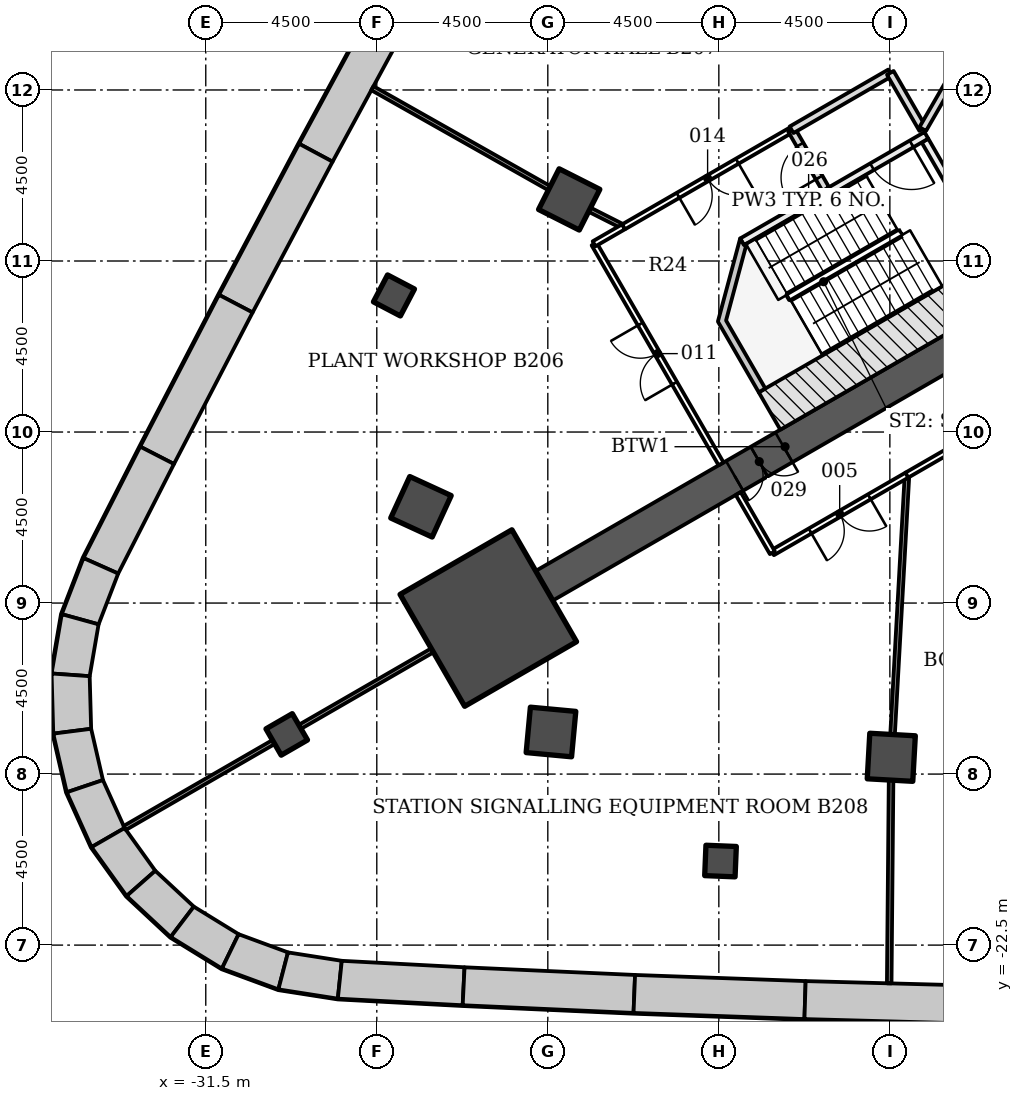
"""IFC4 building model, lengths in metres.
Left out: names, types, materials, properties, quantities, classifications, styles, units other than length and angle.
Written with IfcOpenShell. Run it as: python <this file> out.ifc"""

import sys

from ifc_helpers import new_model, si_unit, direction, frame, frame_2d, origin, origin_2d, place, context, subcontext, project, spatial, polyline, rectangle, outline, extrude, element, fill, save


model = new_model("IFC4")
c1 = context("Model", 3, precision=1e-05, world=origin(), true_north=direction((0.0, 1.0)))
c2 = subcontext(c1, "Body", "Model", "MODEL_VIEW")
j1 = project(units=[si_unit("LENGTHUNIT", "METRE"), si_unit("PLANEANGLEUNIT", "RADIAN")], contexts=[c1])
p1 = place(None, origin())
s1 = spatial("IfcSite", under=j1, at=p1, CompositionType="ELEMENT")
p2 = place(p1, origin())
s2 = spatial("IfcBuilding", under=s1, at=p2, CompositionType="ELEMENT")
p3 = place(p2, frame((0.0, 0.0, -9.0)))
s3 = spatial("IfcBuildingStorey", under=s2, at=p3, CompositionType="ELEMENT", Elevation=-9.0)
p4 = place(p3, origin())
e1 = element("IfcWall", 1, at=p4, inside=s3, PredefinedType="SOLIDWALL", context=c2, shape_type="SweptSolid", body=[
    extrude(outline(polyline([(-26.901, 2.542), (-29.045, -1.415), (-28.164, -1.887), (-26.024, 2.062), (-26.901, 2.542)])), origin(), (0.0, 0.0, 1.0), 4.2),
])
p5 = place(p3, origin())
e2 = element("IfcWall", 2, at=p5, inside=s3, PredefinedType="SOLIDWALL", context=c2, shape_type="SweptSolid", body=[
    extrude(outline(polyline([(-29.045, -1.415), (-31.153, -5.39), (-30.268, -5.854), (-28.164, -1.887), (-29.045, -1.415)])), origin(), (0.0, 0.0, 1.0), 4.2),
])
p6 = place(p3, origin())
e3 = element("IfcWall", 3, at=p6, inside=s3, PredefinedType="SOLIDWALL", context=c2, shape_type="SweptSolid", body=[
    extrude(outline(polyline([(-31.153, -5.39), (-33.226, -9.384), (-32.337, -9.841), (-30.268, -5.854), (-31.153, -5.39)])), origin(), (0.0, 0.0, 1.0), 4.2),
])
p7 = place(p3, origin())
e4 = element("IfcWall", 4, at=p7, inside=s3, PredefinedType="SOLIDWALL", context=c2, shape_type="SweptSolid", body=[
    extrude(outline(polyline([(-33.226, -9.384), (-34.719, -12.316), (-33.804, -12.724), (-32.337, -9.841), (-33.226, -9.384)])), origin(), (0.0, 0.0, 1.0), 4.2),
])
p8 = place(p3, origin())
e5 = element("IfcWall", 5, at=p8, inside=s3, PredefinedType="SOLIDWALL", context=c2, shape_type="SweptSolid", body=[
    extrude(outline(polyline([(-34.719, -12.316), (-35.289, -13.793), (-34.32, -14.06), (-33.804, -12.724), (-34.719, -12.316)])), origin(), (0.0, 0.0, 1.0), 4.2),
])
p9 = place(p3, origin())
e6 = element("IfcWall", 6, at=p9, inside=s3, PredefinedType="SOLIDWALL", context=c2, shape_type="SweptSolid", body=[
    extrude(outline(polyline([(-35.289, -13.793), (-35.557, -15.353), (-34.555, -15.425), (-34.32, -14.06), (-35.289, -13.793)])), origin(), (0.0, 0.0, 1.0), 4.2),
])
p10 = place(p3, origin())
e7 = element("IfcWall", 7, at=p10, inside=s3, PredefinedType="SOLIDWALL", context=c2, shape_type="SweptSolid", body=[
    extrude(outline(polyline([(-35.557, -15.353), (-35.513, -16.936), (-34.516, -16.809), (-34.555, -15.425), (-35.557, -15.353)])), origin(), (0.0, 0.0, 1.0), 4.2),
])
p11 = place(p3, origin())
e8 = element("IfcWall", 8, at=p11, inside=s3, PredefinedType="SOLIDWALL", context=c2, shape_type="SweptSolid", body=[
    extrude(outline(polyline([(-35.513, -16.936), (-35.158, -18.479), (-34.205, -18.158), (-34.516, -16.809), (-35.513, -16.936)])), origin(), (0.0, 0.0, 1.0), 4.2),
])
p12 = place(p3, origin())
e9 = element("IfcWall", 9, at=p12, inside=s3, PredefinedType="SOLIDWALL", context=c2, shape_type="SweptSolid", body=[
    extrude(outline(polyline([(-35.158, -18.479), (-34.506, -19.922), (-33.635, -19.419), (-34.205, -18.158), (-35.158, -18.479)])), origin(), (0.0, 0.0, 1.0), 4.2),
])
p13 = place(p3, origin())
e10 = element("IfcWall", 10, at=p13, inside=s3, PredefinedType="SOLIDWALL", context=c2, shape_type="SweptSolid", body=[
    extrude(outline(polyline([(-34.506, -19.922), (-33.582, -21.208), (-32.828, -20.544), (-33.635, -19.419), (-34.506, -19.922)])), origin(), (0.0, 0.0, 1.0), 4.2),
])
p14 = place(p3, origin())
e11 = element("IfcWall", 11, at=p14, inside=s3, PredefinedType="SOLIDWALL", context=c2, shape_type="SweptSolid", body=[
    extrude(outline(polyline([(-33.582, -21.208), (-32.423, -22.287), (-31.815, -21.487), (-32.828, -20.544), (-33.582, -21.208)])), origin(), (0.0, 0.0, 1.0), 4.2),
])
p15 = place(p3, origin())
e12 = element("IfcWall", 12, at=p15, inside=s3, PredefinedType="SOLIDWALL", context=c2, shape_type="SweptSolid", body=[
    extrude(outline(polyline([(-32.423, -22.287), (-31.075, -23.117), (-30.635, -22.213), (-31.815, -21.487), (-32.423, -22.287)])), origin(), (0.0, 0.0, 1.0), 4.2),
])
p16 = place(p3, origin())
e13 = element("IfcWall", 13, at=p16, inside=s3, PredefinedType="SOLIDWALL", context=c2, shape_type="SweptSolid", body=[
    extrude(outline(polyline([(-31.075, -23.117), (-29.589, -23.665), (-29.337, -22.692), (-30.635, -22.213), (-31.075, -23.117)])), origin(), (0.0, 0.0, 1.0), 4.2),
])
p17 = place(p3, origin())
e14 = element("IfcWall", 14, at=p17, inside=s3, PredefinedType="SOLIDWALL", context=c2, shape_type="SweptSolid", body=[
    extrude(outline(polyline([(-29.589, -23.665), (-28.025, -23.909), (-27.921, -22.913), (-29.337, -22.692), (-29.589, -23.665)])), origin(), (0.0, 0.0, 1.0), 4.2),
])
p18 = place(p3, origin())
e15 = element("IfcWall", 15, at=p18, inside=s3, PredefinedType="SOLIDWALL", context=c2, shape_type="SweptSolid", body=[
    extrude(outline(polyline([(-28.025, -23.909), (-24.74, -24.083), (-24.691, -23.084), (-27.921, -22.913), (-28.025, -23.909)])), origin(), (0.0, 0.0, 1.0), 4.2),
])
p19 = place(p3, origin())
e16 = element("IfcWall", 16, at=p19, inside=s3, PredefinedType="SOLIDWALL", context=c2, shape_type="SweptSolid", body=[
    extrude(outline(polyline([(-24.74, -24.083), (-20.244, -24.285), (-20.204, -23.285), (-24.691, -23.084), (-24.74, -24.083)])), origin(), (0.0, 0.0, 1.0), 4.2),
])
p20 = place(p3, origin())
e17 = element("IfcWall", 17, at=p20, inside=s3, PredefinedType="SOLIDWALL", context=c2, shape_type="SweptSolid", body=[
    extrude(outline(polyline([(-20.244, -24.285), (-15.747, -24.446), (-15.716, -23.447), (-20.204, -23.285), (-20.244, -24.285)])), origin(), (0.0, 0.0, 1.0), 4.2),
])
p21 = place(p3, origin())
e18 = element("IfcWall", 18, at=p21, inside=s3, PredefinedType="SOLIDWALL", context=c2, shape_type="SweptSolid", body=[
    extrude(outline(polyline([(-15.747, -24.446), (-11.249, -24.568), (-11.227, -23.568), (-15.716, -23.447), (-15.747, -24.446)])), origin(), (0.0, 0.0, 1.0), 4.2),
])
for number, where, z_axis, x_axis in (
    (19, (-21.937, -2.88, -0.3), (0.0, 0.0, 1.0), (-0.893, 0.451, 0.0)),
    (20, (-25.838, -10.967, -0.3), (0.0, 0.0, 1.0), (-0.909, 0.418, 0.0)),
    (21, (-22.417, -16.893, -0.3), (0.0, 0.0, 1.0), (-0.093, -0.996, 0.0)),
    (22, (-13.462, -17.558, -0.3), (0.0, 0.0, 1.0), (-0.056, -0.998, 0.0)),
):
    element("IfcColumn", number, at=place(p3, frame(where, z_axis=z_axis, x_axis=x_axis)), inside=s3, PredefinedType="COLUMN", context=c2, shape_type="SweptSolid", body=[
        extrude(rectangle(XDim=1.2, YDim=1.2, at=origin_2d()), origin(), (0.0, 0.0, 1.0), 4.5),
    ])
for number, where, z_axis, x_axis in (
    (23, (-26.548, -5.406, -0.3), (0.0, 0.0, 1.0), (-0.886, 0.464, 0.0)),
    (24, (-29.37, -16.957, -0.3), (0.0, 0.0, 1.0), (-0.866, -0.5, 0.0)),
    (25, (-17.956, -20.288, -0.3), (0.0, 0.0, 1.0), (-0.041, -0.999, 0.0)),
):
    element("IfcColumn", number, at=place(p3, frame(where, z_axis=z_axis, x_axis=x_axis)), inside=s3, PredefinedType="COLUMN", context=c2, shape_type="SweptSolid", body=[
        extrude(rectangle(XDim=0.8, YDim=0.8, at=origin_2d()), origin(), (0.0, 0.0, 1.0), 4.5),
    ])
p22 = place(p3, frame((-9.922, -5.728, -0.3), z_axis=(0.0, 0.0, 1.0), x_axis=(-0.866028046028, -0.499995423472, 0.0)))
e26 = element("IfcWall", 26, at=p22, inside=s3, PredefinedType="SHEAR", context=c2, shape_type="SweptSolid", body=[
    extrude(rectangle(XDim=14.633, YDim=0.9, at=frame_2d((7.316, 0.0))), origin(), (0.0, 0.0, 1.0), 4.5),
])
p23 = place(p22, frame((7.35, 0.0, 0.3)))
e27 = element("IfcOpeningElement", 27, at=p23, cuts=e26, PredefinedType="OPENING", context=c2, shape_type="SweptSolid", body=[
    extrude(rectangle(XDim=1.5, YDim=2.1, at=frame_2d((0.75, 1.05))), frame((0.0, 0.46, 0.0), z_axis=(0.0, -1.0, 0.0), x_axis=(1.0, 0.0, 0.0)), (0.0, 0.0, 1.0), 0.92),
])
p24 = place(p3, frame((-24.066, -13.895, -0.3), z_axis=(0.0, 0.0, 1.0), x_axis=(-0.866025403784, -0.5, 0.0)))
e28 = element("IfcColumn", 28, at=p24, inside=s3, PredefinedType="COLUMN", context=c2, shape_type="SweptSolid", body=[
    extrude(rectangle(XDim=3.4, YDim=3.4, at=origin_2d()), origin(), (0.0, 0.0, 1.0), 4.5),
])
p25 = place(p3, frame((-12.576, -1.331, -0.3), z_axis=(0.0, 0.0, 1.0), x_axis=(0.499970499736, -0.8660424351, 0.0)))
e29 = element("IfcWall", 29, at=p25, inside=s3, PredefinedType="SHEAR", context=c2, shape_type="SweptSolid", body=[
    extrude(rectangle(XDim=3.55, YDim=0.2, at=frame_2d((1.775, 0.0))), origin(), (0.0, 0.0, 1.0), 4.5),
])
p26 = place(p25, frame((1.175, 0.0, 0.3)))
e30 = element("IfcOpeningElement", 30, at=p26, cuts=e29, PredefinedType="OPENING", context=c2, shape_type="SweptSolid", body=[
    extrude(rectangle(XDim=1.2, YDim=2.1, at=frame_2d((0.6, 1.05))), frame((0.0, 0.11, 0.0), z_axis=(0.0, -1.0, 0.0), x_axis=(1.0, 0.0, 0.0)), (0.0, 0.0, 1.0), 0.22),
])
p27 = place(p3, frame((-12.539, -1.194, -0.3), z_axis=(0.0, 0.0, 1.0), x_axis=(-0.866045472092, -0.499965239061, 0.0)))
e31 = element("IfcWall", 31, at=p27, inside=s3, PredefinedType="SHEAR", context=c2, shape_type="SweptSolid", body=[
    extrude(rectangle(XDim=5.6, YDim=0.2, at=frame_2d((2.8, 0.0))), origin(), (0.0, 0.0, 1.0), 4.5),
])
p28 = place(p27, frame((0.45, 0.0, 0.3)))
e32 = element("IfcOpeningElement", 32, at=p28, cuts=e31, PredefinedType="OPENING", context=c2, shape_type="SweptSolid", body=[
    extrude(rectangle(XDim=1.2, YDim=2.1, at=frame_2d((0.6, 1.05))), frame((0.0, 0.11, 0.0), z_axis=(0.0, -1.0, 0.0), x_axis=(1.0, 0.0, 0.0)), (0.0, 0.0, 1.0), 0.22),
])
p29 = place(p3, frame((-10.43, -4.847, -0.3), z_axis=(0.0, 0.0, 1.0), x_axis=(-0.866018442252, -0.500012057535, 0.0)))
e33 = element("IfcWall", 33, at=p29, inside=s3, PredefinedType="SHEAR", context=c2, shape_type="SweptSolid", body=[
    extrude(rectangle(XDim=7.2, YDim=1.136, at=frame_2d((3.6, 0.0))), origin(), (0.0, 0.0, 1.0), 4.5),
])
p30 = place(p3, frame((0.0, 0.0, -0.3)))
e34 = element("IfcWall", 34, at=p30, inside=s3, PredefinedType="SHEAR", context=c2, shape_type="SweptSolid", body=[
    extrude(outline(polyline([(-17.439, -3.907), (-18.025, -6.093), (-16.95, -7.955), (-16.777, -7.855), (-17.81, -6.065), (-17.267, -4.039), (-17.339, -4.081), (-17.339, -4.081), (-17.339, -4.081), (-17.339, -4.081), (-17.339, -4.081), (-17.339, -4.081), (-17.339, -4.081), (-17.339, -4.081), (-17.339, -4.081), (-17.339, -4.081), (-17.339, -4.081), (-17.339, -4.081), (-17.339, -4.081), (-17.339, -4.081), (-17.339, -4.081), (-17.339, -4.081), (-17.339, -4.081), (-17.439, -3.907)])), origin(), (0.0, 0.0, 1.0), 4.5),
])
p31 = place(p3, frame((-13.517, -23.506, 0.0), z_axis=(0.0, 0.0, 1.0), x_axis=(0.00917685765, 0.999957891755, 0.0)))
e35 = element("IfcWall", 35, at=p31, inside=s3, PredefinedType="PARTITIONING", context=c2, shape_type="SweptSolid", body=[
    extrude(rectangle(XDim=5.347, YDim=0.12, at=frame_2d((2.674, 0.0))), origin(), (0.0, 0.0, 1.0), 3.583),
])
p32 = place(p3, frame((-13.429, -16.96, 0.0), z_axis=(0.0, 0.0, 1.0), x_axis=(0.055551088657, 0.998455846069, 0.0)))
e36 = element("IfcWall", 36, at=p32, inside=s3, PredefinedType="PARTITIONING", context=c2, shape_type="SweptSolid", body=[
    extrude(rectangle(XDim=6.838, YDim=0.12, at=frame_2d((3.419, 0.0))), origin(), (0.0, 0.0, 1.0), 3.588),
])
p33 = place(p3, frame((-13.045, -10.13, 0.0), z_axis=(0.0, 0.0, 1.0), x_axis=(-0.866035577775, -0.499982377718, 0.0)))
e37 = element("IfcWall", 37, at=p33, inside=s3, PredefinedType="PARTITIONING", context=c2, shape_type="SweptSolid", body=[
    extrude(rectangle(XDim=4.093, YDim=0.15, at=frame_2d((2.046, 0.0))), origin(), (0.0, 0.0, 1.0), 3.588),
])
p34 = place(p33, frame((1.15, 0.0, 0.0)))
e38 = element("IfcOpeningElement", 38, at=p34, cuts=e37, PredefinedType="OPENING", context=c2, shape_type="SweptSolid", body=[
    extrude(rectangle(XDim=1.8, YDim=2.1, at=frame_2d((0.9, 1.05))), frame((0.0, 0.085, 0.0), z_axis=(0.0, -1.0, 0.0), x_axis=(1.0, 0.0, 0.0)), (0.0, 0.0, 1.0), 0.17),
])
p35 = place(p3, frame((-16.591, -12.176, 0.0), z_axis=(0.0, 0.0, 1.0), x_axis=(-0.499965372359, 0.866045395139, 0.0)))
e39 = element("IfcWall", 39, at=p35, inside=s3, PredefinedType="PARTITIONING", context=c2, shape_type="SweptSolid", body=[
    extrude(rectangle(XDim=1.798, YDim=0.15, at=frame_2d((0.899, 0.0))), origin(), (0.0, 0.0, 1.0), 3.588),
])
p36 = place(p3, frame((-29.716, -17.157, 0.0), z_axis=(0.0, 0.0, 1.0), x_axis=(-0.866032814021, -0.499987164874, 0.0)))
e40 = element("IfcWall", 40, at=p36, inside=s3, PredefinedType="PARTITIONING", context=c2, shape_type="SweptSolid", body=[
    extrude(rectangle(XDim=4.524, YDim=0.12, at=frame_2d((2.262, 0.0))), origin(), (0.0, 0.0, 1.0), 4.2),
])
p37 = place(p3, frame((-25.538, -14.745, 0.0), z_axis=(0.0, 0.0, 1.0), x_axis=(-0.866027971625, -0.499995552344, 0.0)))
e41 = element("IfcWall", 41, at=p37, inside=s3, PredefinedType="PARTITIONING", context=c2, shape_type="SweptSolid", body=[
    extrude(rectangle(XDim=4.024, YDim=0.12, at=frame_2d((2.012, 0.0))), origin(), (0.0, 0.0, 1.0), 3.667),
])
p38 = place(p3, frame((-11.828, -9.427, 0.0), z_axis=(0.0, 0.0, 1.0), x_axis=(-0.866110865696, -0.499851946404, 0.0)))
e42 = element("IfcWall", 42, at=p38, inside=s3, PredefinedType="PARTITIONING", context=c2, shape_type="SweptSolid", body=[
    extrude(rectangle(XDim=1.415, YDim=0.15, at=frame_2d((0.707, 0.0))), origin(), (0.0, 0.0, 1.0), 3.588),
])
p39 = place(p3, frame((-17.941, -9.838, 0.0), z_axis=(0.0, 0.0, 1.0), x_axis=(-0.500048140185, 0.865997608252, 0.0)))
e43 = element("IfcWall", 43, at=p39, inside=s3, PredefinedType="PARTITIONING", context=c2, shape_type="SweptSolid", body=[
    extrude(rectangle(XDim=6.683, YDim=0.15, at=frame_2d((3.342, 0.0))), origin(), (0.0, 0.0, 1.0), 3.588),
])
p40 = place(p39, frame((2.45, 0.0, 0.0)))
e44 = element("IfcOpeningElement", 44, at=p40, cuts=e43, PredefinedType="OPENING", context=c2, shape_type="SweptSolid", body=[
    extrude(rectangle(XDim=1.8, YDim=2.1, at=frame_2d((0.9, 1.05))), frame((0.0, 0.085, 0.0), z_axis=(0.0, -1.0, 0.0), x_axis=(1.0, 0.0, 0.0)), (0.0, 0.0, 1.0), 0.17),
])
p41 = place(p3, frame((-21.283, -4.048, 0.0), z_axis=(0.0, 0.0, 1.0), x_axis=(0.865804825377, 0.500381858538, 0.0)))
e45 = element("IfcWall", 45, at=p41, inside=s3, PredefinedType="PARTITIONING", context=c2, shape_type="SweptSolid", body=[
    extrude(rectangle(XDim=0.897, YDim=0.15, at=frame_2d((0.449, 0.0))), origin(), (0.0, 0.0, 1.0), 3.588),
])
p42 = place(p3, frame((-22.461, -2.584, 0.0), z_axis=(0.0, 0.0, 1.0), x_axis=(-0.87056283872, 0.492057256668, 0.0)))
e46 = element("IfcWall", 46, at=p42, inside=s3, PredefinedType="PARTITIONING", context=c2, shape_type="SweptSolid", body=[
    extrude(rectangle(XDim=5.347, YDim=0.12, at=frame_2d((2.674, 0.0))), origin(), (0.0, 0.0, 1.0), 3.583),
])
p43 = place(p3, frame((-20.509, -3.601, 0.0), z_axis=(0.0, 0.0, 1.0), x_axis=(-0.892316605155, 0.451410097544, 0.0)))
e47 = element("IfcWall", 47, at=p43, inside=s3, PredefinedType="PARTITIONING", context=c2, shape_type="SweptSolid", body=[
    extrude(rectangle(XDim=1.0, YDim=0.12, at=frame_2d((0.5, 0.0))), origin(), (0.0, 0.0, 1.0), 3.588),
])
p44 = place(p3, frame((-16.087, -1.049, 0.0), z_axis=(0.0, 0.0, 1.0), x_axis=(-0.866071706002, -0.49991979363, 0.0)))
e48 = element("IfcWall", 48, at=p44, inside=s3, PredefinedType="PARTITIONING", context=c2, shape_type="SweptSolid", body=[
    extrude(rectangle(XDim=5.105, YDim=0.15, at=frame_2d((2.552, 0.0))), origin(), (0.0, 0.0, 1.0), 3.588),
])
p45 = place(p44, frame((1.65, 0.0, 0.0)))
e49 = element("IfcOpeningElement", 49, at=p45, cuts=e48, PredefinedType="OPENING", context=c2, shape_type="SweptSolid", body=[
    extrude(rectangle(XDim=1.8, YDim=2.1, at=frame_2d((0.9, 1.05))), frame((0.0, 0.085, 0.0), z_axis=(0.0, -1.0, 0.0), x_axis=(1.0, 0.0, 0.0)), (0.0, 0.0, 1.0), 0.17),
])
p46 = place(p3, frame((-15.188, -2.607, 0.0), z_axis=(0.0, 0.0, 1.0), x_axis=(-0.500024172624, 0.866011447264, 0.0)))
e50 = element("IfcWall", 50, at=p46, inside=s3, PredefinedType="PARTITIONING", context=c2, shape_type="SweptSolid", body=[
    extrude(rectangle(XDim=1.798, YDim=0.2, at=frame_2d((0.899, 0.0))), origin(), (0.0, 0.0, 1.0), 3.588),
])
p47 = place(p46, frame((0.35, 0.0, 0.0)))
e51 = element("IfcOpeningElement", 51, at=p47, cuts=e50, PredefinedType="OPENING", context=c2, shape_type="SweptSolid", body=[
    extrude(rectangle(XDim=1.0, YDim=2.1, at=frame_2d((0.5, 1.05))), frame((0.0, 0.11, 0.0), z_axis=(0.0, -1.0, 0.0), x_axis=(1.0, 0.0, 0.0)), (0.0, 0.0, 1.0), 0.22),
])
p48 = place(p3, frame((-16.087, -1.048, 0.0), z_axis=(0.0, 0.0, 1.0), x_axis=(0.865988915629, 0.500063194015, 0.0)))
e52 = element("IfcWall", 52, at=p48, inside=s3, PredefinedType="PARTITIONING", context=c2, shape_type="SweptSolid", body=[
    extrude(rectangle(XDim=2.998, YDim=0.2, at=frame_2d((1.499, 0.0))), origin(), (0.0, 0.0, 1.0), 3.588),
])
p49 = place(p3, frame((-13.489, 0.451, 0.0), z_axis=(0.0, 0.0, 1.0), x_axis=(0.500044178772, -0.865999895656, 0.0)))
e53 = element("IfcWall", 53, at=p49, inside=s3, PredefinedType="PARTITIONING", context=c2, shape_type="SweptSolid", body=[
    extrude(rectangle(XDim=1.708, YDim=0.2, at=frame_2d((0.854, 0.0))), origin(), (0.0, 0.0, 1.0), 4.2),
])
p50 = place(p3, frame((-12.635, -1.028, 0.0), z_axis=(0.0, 0.0, 1.0), x_axis=(0.50005725472, 0.865992345233, 0.0)))
e54 = element("IfcWall", 54, at=p50, inside=s3, PredefinedType="PARTITIONING", context=c2, shape_type="SweptSolid", body=[
    extrude(rectangle(XDim=2.862, YDim=0.2, at=frame_2d((1.431, 0.0))), origin(), (0.0, 0.0, 1.0), 3.588),
])
p51 = place(p28, origin())
e55 = element("IfcDoor", 55, at=p51, inside=s3, OperationType="SINGLE_SWING_LEFT", PredefinedType="DOOR", context=c2, shape_type="SweptSolid", body=[
    extrude(rectangle(XDim=1.2, YDim=2.1, at=frame_2d((0.6, 1.05))), frame((0.0, 0.025, 0.0), z_axis=(0.0, -1.0, 0.0), x_axis=(1.0, 0.0, 0.0)), (0.0, 0.0, 1.0), 0.05),
])
fill(e32, e55)
p52 = place(p34, origin())
e56 = element("IfcDoor", 56, at=p52, inside=s3, OperationType="DOUBLE_DOOR_SINGLE_SWING", PredefinedType="DOOR", context=c2, shape_type="SweptSolid", body=[
    extrude(rectangle(XDim=1.8, YDim=2.1, at=frame_2d((0.9, 1.05))), frame((0.0, 0.025, 0.0), z_axis=(0.0, -1.0, 0.0), x_axis=(1.0, 0.0, 0.0)), (0.0, 0.0, 1.0), 0.05),
])
fill(e38, e56)
p53 = place(p40, origin())
e57 = element("IfcDoor", 57, at=p53, inside=s3, OperationType="DOUBLE_DOOR_SINGLE_SWING", PredefinedType="DOOR", context=c2, shape_type="SweptSolid", body=[
    extrude(rectangle(XDim=1.8, YDim=2.1, at=frame_2d((0.9, 1.05))), frame((0.0, 0.025, 0.0), z_axis=(0.0, -1.0, 0.0), x_axis=(1.0, 0.0, 0.0)), (0.0, 0.0, 1.0), 0.05),
])
fill(e44, e57)
p54 = place(p45, origin())
e58 = element("IfcDoor", 58, at=p54, inside=s3, OperationType="DOUBLE_DOOR_SINGLE_SWING", PredefinedType="DOOR", context=c2, shape_type="SweptSolid", body=[
    extrude(rectangle(XDim=1.8, YDim=2.1, at=frame_2d((0.9, 1.05))), frame((0.0, 0.025, 0.0), z_axis=(0.0, -1.0, 0.0), x_axis=(1.0, 0.0, 0.0)), (0.0, 0.0, 1.0), 0.05),
])
fill(e49, e58)
p55 = place(p47, origin())
e59 = element("IfcDoor", 59, at=p55, inside=s3, OperationType="SINGLE_SWING_LEFT", PredefinedType="DOOR", context=c2, shape_type="SweptSolid", body=[
    extrude(rectangle(XDim=1.0, YDim=2.1, at=frame_2d((0.5, 1.05))), frame((0.0, 0.025, 0.0), z_axis=(0.0, -1.0, 0.0), x_axis=(1.0, 0.0, 0.0)), (0.0, 0.0, 1.0), 0.05),
])
fill(e51, e59)
p56 = place(p23, origin())
e60 = element("IfcDoor", 60, at=p56, inside=s3, OperationType="DOUBLE_DOOR_SINGLE_SWING", PredefinedType="DOOR", context=c2, shape_type="SweptSolid", body=[
    extrude(rectangle(XDim=1.5, YDim=2.1, at=frame_2d((0.75, 1.05))), frame((0.0, 0.025, 0.0), z_axis=(0.0, -1.0, 0.0), x_axis=(1.0, 0.0, 0.0)), (0.0, 0.0, 1.0), 0.05),
])
fill(e27, e60)
save(model, sys.argv[1])
